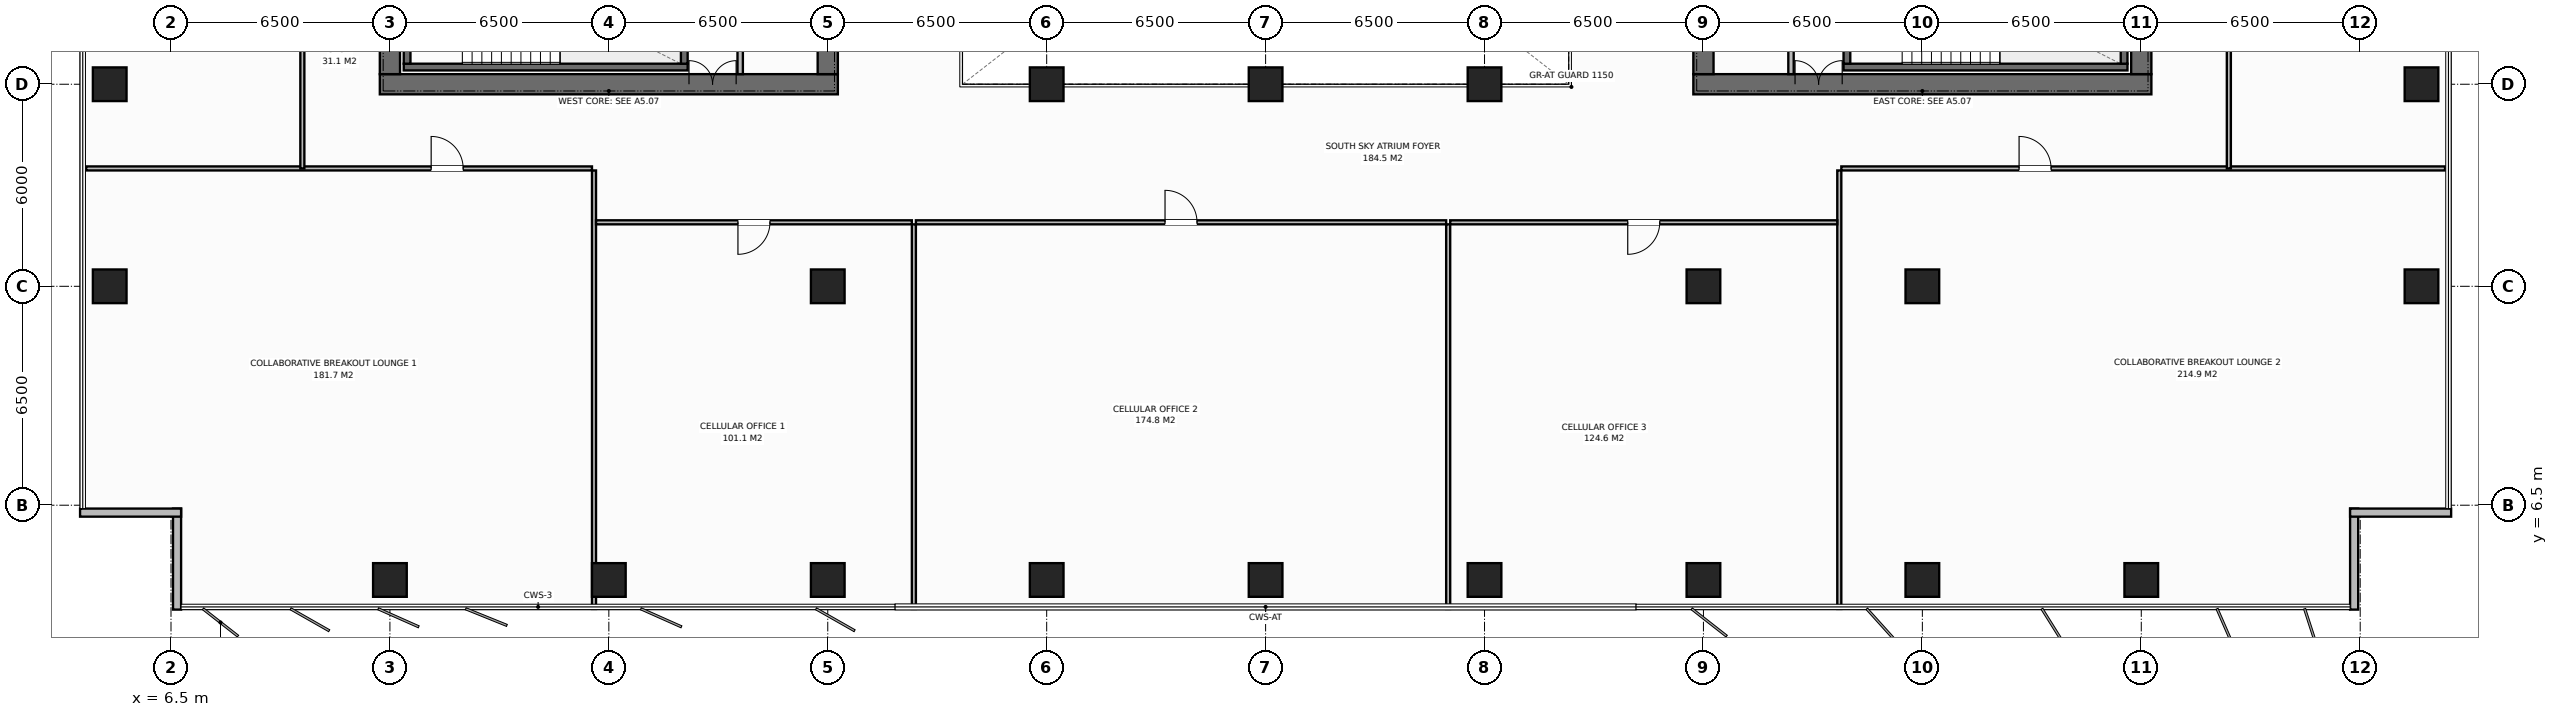
"""IFC4 building model, lengths in metres.
Left out: names, types, materials, properties, quantities, classifications, styles, units other than length and angle.
Written with IfcOpenShell. Run it as: python <this file> out.ifc"""

import sys

from ifc_helpers import new_model, si_unit, direction, frame, frame_2d, origin, origin_2d, place, context, subcontext, project, spatial, rectangle, extrude, element, fill, save


model = new_model("IFC4")
c1 = context("Model", 3, precision=1e-05, world=origin(), true_north=direction((0.0, 1.0)))
c2 = subcontext(c1, "Body", "Model", "MODEL_VIEW")
j1 = project(units=[si_unit("LENGTHUNIT", "METRE"), si_unit("PLANEANGLEUNIT", "RADIAN")], contexts=[c1])
p1 = place(None, origin())
s1 = spatial("IfcSite", under=j1, at=p1, CompositionType="ELEMENT")
p2 = place(p1, origin())
s2 = spatial("IfcBuilding", under=s1, at=p2, CompositionType="ELEMENT")
p3 = place(p2, frame((0.0, 0.0, 148.0)))
s3 = spatial("IfcBuildingStorey", under=s2, at=p3, CompositionType="ELEMENT", Elevation=148.0)
p4 = place(p3, frame((12.7, 19.0, 0.0), z_axis=(0.0, 0.0, 1.0), x_axis=(1.0, 0.0, 0.0)))
e1 = element("IfcWall", 1, at=p4, inside=s3, PredefinedType="SHEAR", context=c2, shape_type="SweptSolid", body=[
    extrude(rectangle(XDim=13.6, YDim=0.6, at=frame_2d((6.8, 0.0))), origin(), (0.0, 0.0, 1.0), 3.8),
])
p5 = place(p4, frame((9.18, 0.0, 0.0)))
e2 = element("IfcOpeningElement", 2, at=p5, cuts=e1, PredefinedType="OPENING", context=c2, shape_type="SweptSolid", body=[
    extrude(rectangle(XDim=1.4, YDim=2.2, at=frame_2d((0.7, 1.1))), frame((0.0, 0.31, 0.0), z_axis=(0.0, -1.0, 0.0), x_axis=(1.0, 0.0, 0.0)), (0.0, 0.0, 1.0), 0.62),
])
p6 = place(p3, frame((13.0, 19.3, 0.0), z_axis=(0.0, 0.0, 1.0), x_axis=(0.0, 1.0, 0.0)))
e3 = element("IfcWall", 3, at=p6, inside=s3, PredefinedType="SHEAR", context=c2, shape_type="SweptSolid", body=[
    extrude(rectangle(XDim=13.4, YDim=0.6, at=frame_2d((6.7, 0.0))), origin(), (0.0, 0.0, 1.0), 3.8),
])
p7 = place(p6, frame((4.75, 0.0, 0.0)))
e4 = element("IfcOpeningElement", 4, at=p7, cuts=e3, PredefinedType="OPENING", context=c2, shape_type="SweptSolid", body=[
    extrude(rectangle(XDim=1.4, YDim=2.2, at=frame_2d((0.7, 1.1))), frame((0.0, 0.31, 0.0), z_axis=(0.0, -1.0, 0.0), x_axis=(1.0, 0.0, 0.0)), (0.0, 0.0, 1.0), 0.62),
])
p8 = place(p3, frame((26.0, 19.3, 0.0), z_axis=(0.0, 0.0, 1.0), x_axis=(0.0, 1.0, 0.0)))
e5 = element("IfcWall", 5, at=p8, inside=s3, PredefinedType="SHEAR", context=c2, shape_type="SweptSolid", body=[
    extrude(rectangle(XDim=13.4, YDim=0.6, at=frame_2d((6.7, 0.0))), origin(), (0.0, 0.0, 1.0), 3.8),
])
p9 = place(p3, frame((51.7, 19.0, 0.0), z_axis=(0.0, 0.0, 1.0), x_axis=(1.0, 0.0, 0.0)))
e6 = element("IfcWall", 6, at=p9, inside=s3, PredefinedType="SHEAR", context=c2, shape_type="SweptSolid", body=[
    extrude(rectangle(XDim=13.6, YDim=0.6, at=frame_2d((6.8, 0.0))), origin(), (0.0, 0.0, 1.0), 3.8),
])
p10 = place(p9, frame((3.02, 0.0, 0.0)))
e7 = element("IfcOpeningElement", 7, at=p10, cuts=e6, PredefinedType="OPENING", context=c2, shape_type="SweptSolid", body=[
    extrude(rectangle(XDim=1.4, YDim=2.2, at=frame_2d((0.7, 1.1))), frame((0.0, 0.31, 0.0), z_axis=(0.0, -1.0, 0.0), x_axis=(1.0, 0.0, 0.0)), (0.0, 0.0, 1.0), 0.62),
])
p11 = place(p3, frame((52.0, 19.3, 0.0), z_axis=(0.0, 0.0, 1.0), x_axis=(0.0, 1.0, 0.0)))
e8 = element("IfcWall", 8, at=p11, inside=s3, PredefinedType="SHEAR", context=c2, shape_type="SweptSolid", body=[
    extrude(rectangle(XDim=13.4, YDim=0.6, at=frame_2d((6.7, 0.0))), origin(), (0.0, 0.0, 1.0), 3.8),
])
p12 = place(p3, frame((65.0, 19.3, 0.0), z_axis=(0.0, 0.0, 1.0), x_axis=(0.0, 1.0, 0.0)))
e9 = element("IfcWall", 9, at=p12, inside=s3, PredefinedType="SHEAR", context=c2, shape_type="SweptSolid", body=[
    extrude(rectangle(XDim=13.4, YDim=0.6, at=frame_2d((6.7, 0.0))), origin(), (0.0, 0.0, 1.0), 3.8),
])
p13 = place(p12, frame((8.15, 0.0, 0.0)))
e10 = element("IfcOpeningElement", 10, at=p13, cuts=e9, PredefinedType="OPENING", context=c2, shape_type="SweptSolid", body=[
    extrude(rectangle(XDim=1.3, YDim=2.2, at=frame_2d((0.65, 1.1))), frame((0.0, 0.31, 0.0), z_axis=(0.0, -1.0, 0.0), x_axis=(1.0, 0.0, 0.0)), (0.0, 0.0, 1.0), 0.62),
])
p14 = place(p3, frame((13.41, 19.51, 0.0), z_axis=(0.0, 0.0, 1.0), x_axis=(1.0, 0.0, 0.0)))
e11 = element("IfcWall", 11, at=p14, inside=s3, PredefinedType="SHEAR", context=c2, shape_type="SweptSolid", body=[
    extrude(rectangle(XDim=8.43, YDim=0.2, at=frame_2d((4.215, 0.0))), origin(), (0.0, 0.0, 1.0), 3.8),
])
for number, where, z_axis, x_axis in (
    (12, (13.51, 19.61, 0.0), (0.0, 0.0, 1.0), (0.0, 1.0, 0.0)),
    (13, (21.74, 19.61, 0.0), (0.0, 0.0, 1.0), (0.0, 1.0, 0.0)),
):
    element("IfcWall", number, at=place(p3, frame(where, z_axis=z_axis, x_axis=x_axis)), inside=s3, PredefinedType="SHEAR", context=c2, shape_type="SweptSolid", body=[
        extrude(rectangle(XDim=3.28, YDim=0.2, at=frame_2d((1.64, 0.0))), origin(), (0.0, 0.0, 1.0), 3.8),
    ])
p15 = place(p3, frame((56.16, 19.51, 0.0), z_axis=(0.0, 0.0, 1.0), x_axis=(1.0, 0.0, 0.0)))
e14 = element("IfcWall", 14, at=p15, inside=s3, PredefinedType="SHEAR", context=c2, shape_type="SweptSolid", body=[
    extrude(rectangle(XDim=8.43, YDim=0.2, at=frame_2d((4.215, 0.0))), origin(), (0.0, 0.0, 1.0), 3.8),
])
for number, where, z_axis, x_axis in (
    (15, (56.26, 19.61, 0.0), (0.0, 0.0, 1.0), (0.0, 1.0, 0.0)),
    (16, (64.49, 19.61, 0.0), (0.0, 0.0, 1.0), (0.0, 1.0, 0.0)),
):
    element("IfcWall", number, at=place(p3, frame(where, z_axis=z_axis, x_axis=x_axis)), inside=s3, PredefinedType="SHEAR", context=c2, shape_type="SweptSolid", body=[
        extrude(rectangle(XDim=3.28, YDim=0.2, at=frame_2d((1.64, 0.0))), origin(), (0.0, 0.0, 1.0), 3.8),
    ])
for number, where, z_axis, x_axis in (
    (17, (58.5, 13.0, 0.0), (0.0, 0.0, 1.0), (1.0, 0.0, 0.0)),
    (18, (32.5, 19.0, 0.0), (0.0, 0.0, 1.0), (1.0, 0.0, 0.0)),
    (19, (39.0, 19.0, 0.0), (0.0, 0.0, 1.0), (1.0, 0.0, 0.0)),
    (20, (45.5, 19.0, 0.0), (0.0, 0.0, 1.0), (1.0, 0.0, 0.0)),
    (21, (26.0, 13.0, 0.0), (0.0, 0.0, 1.0), (1.0, 0.0, 0.0)),
    (22, (52.0, 13.0, 0.0), (0.0, 0.0, 1.0), (1.0, 0.0, 0.0)),
    (23, (13.0, 4.28, 0.0), (0.0, 0.0, 1.0), (1.0, 0.0, 0.0)),
    (24, (19.5, 4.28, 0.0), (0.0, 0.0, 1.0), (1.0, 0.0, 0.0)),
    (25, (26.0, 4.28, 0.0), (0.0, 0.0, 1.0), (1.0, 0.0, 0.0)),
    (26, (32.5, 4.28, 0.0), (0.0, 0.0, 1.0), (1.0, 0.0, 0.0)),
    (27, (39.0, 4.28, 0.0), (0.0, 0.0, 1.0), (1.0, 0.0, 0.0)),
    (28, (45.5, 4.28, 0.0), (0.0, 0.0, 1.0), (1.0, 0.0, 0.0)),
    (29, (52.0, 4.28, 0.0), (0.0, 0.0, 1.0), (1.0, 0.0, 0.0)),
    (30, (58.5, 4.28, 0.0), (0.0, 0.0, 1.0), (1.0, 0.0, 0.0)),
    (31, (65.0, 4.28, 0.0), (0.0, 0.0, 1.0), (1.0, 0.0, 0.0)),
    (32, (4.68, 13.0, 0.0), (0.0, 0.0, 1.0), (1.0, 0.0, 0.0)),
    (33, (73.32, 13.0, 0.0), (0.0, 0.0, 1.0), (1.0, 0.0, 0.0)),
    (34, (4.68, 19.0, 0.0), (0.0, 0.0, 1.0), (1.0, 0.0, 0.0)),
    (35, (73.32, 19.0, 0.0), (0.0, 0.0, 1.0), (1.0, 0.0, 0.0)),
):
    element("IfcColumn", number, at=place(p3, frame(where, z_axis=z_axis, x_axis=x_axis)), inside=s3, PredefinedType="COLUMN", context=c2, shape_type="SweptSolid", body=[
        extrude(rectangle(XDim=1.0, YDim=1.0, at=origin_2d()), origin(), (0.0, 0.0, 1.0), 3.8),
    ])
for number, where, z_axis, x_axis in (
    (36, (6.68, 3.4, 0.0), (0.0, 0.0, 1.0), (0.0, 1.0, 0.0)),
    (37, (6.8, 6.28, 0.0), (0.0, 0.0, 1.0), (-1.0, 0.0, 0.0)),
    (38, (71.32, 6.4, 0.0), (0.0, 0.0, 1.0), (0.0, -1.0, 0.0)),
    (39, (74.2, 6.28, 0.0), (0.0, 0.0, 1.0), (-1.0, 0.0, 0.0)),
):
    element("IfcWall", number, at=place(p3, frame(where, z_axis=z_axis, x_axis=x_axis)), inside=s3, PredefinedType="STANDARD", context=c2, shape_type="SweptSolid", body=[
        extrude(rectangle(XDim=3.0, YDim=0.24, at=frame_2d((1.5, 0.0))), origin(), (0.0, 0.0, 1.0), 3.572),
    ])
p16 = place(p3, frame((23.4, 19.3, 0.0), z_axis=(0.0, 0.0, 1.0), x_axis=(0.0, 1.0, 0.0)))
e40 = element("IfcWall", 40, at=p16, inside=s3, PredefinedType="STANDARD", context=c2, shape_type="SweptSolid", body=[
    extrude(rectangle(XDim=13.4, YDim=0.16, at=frame_2d((6.7, 0.0))), origin(), (0.0, 0.0, 1.0), 3.572),
])
p17 = place(p16, frame((1.7, 0.0, 0.0)))
e41 = element("IfcOpeningElement", 41, at=p17, cuts=e40, PredefinedType="OPENING", context=c2, shape_type="SweptSolid", body=[
    extrude(rectangle(XDim=0.95, YDim=2.15, at=frame_2d((0.475, 1.075))), frame((0.0, 0.09, 0.0), z_axis=(0.0, -1.0, 0.0), x_axis=(1.0, 0.0, 0.0)), (0.0, 0.0, 1.0), 0.18),
])
p18 = place(p16, frame((9.3, 0.0, 0.0)))
e42 = element("IfcOpeningElement", 42, at=p18, cuts=e40, PredefinedType="OPENING", context=c2, shape_type="SweptSolid", body=[
    extrude(rectangle(XDim=1.1, YDim=2.2, at=frame_2d((0.55, 1.1))), frame((0.0, 0.09, 0.0), z_axis=(0.0, -1.0, 0.0), x_axis=(1.0, 0.0, 0.0)), (0.0, 0.0, 1.0), 0.18),
])
p19 = place(p16, frame((11.5, 0.0, 0.0)))
e43 = element("IfcOpeningElement", 43, at=p19, cuts=e40, PredefinedType="OPENING", context=c2, shape_type="SweptSolid", body=[
    extrude(rectangle(XDim=1.1, YDim=2.2, at=frame_2d((0.55, 1.1))), frame((0.0, 0.09, 0.0), z_axis=(0.0, -1.0, 0.0), x_axis=(1.0, 0.0, 0.0)), (0.0, 0.0, 1.0), 0.18),
])
p20 = place(p3, frame((54.6, 19.3, 0.0), z_axis=(0.0, 0.0, 1.0), x_axis=(0.0, 1.0, 0.0)))
e44 = element("IfcWall", 44, at=p20, inside=s3, PredefinedType="STANDARD", context=c2, shape_type="SweptSolid", body=[
    extrude(rectangle(XDim=13.4, YDim=0.16, at=frame_2d((6.7, 0.0))), origin(), (0.0, 0.0, 1.0), 3.572),
])
p21 = place(p20, frame((1.7, 0.0, 0.0)))
e45 = element("IfcOpeningElement", 45, at=p21, cuts=e44, PredefinedType="OPENING", context=c2, shape_type="SweptSolid", body=[
    extrude(rectangle(XDim=0.95, YDim=2.15, at=frame_2d((0.475, 1.075))), frame((0.0, 0.09, 0.0), z_axis=(0.0, -1.0, 0.0), x_axis=(1.0, 0.0, 0.0)), (0.0, 0.0, 1.0), 0.18),
])
p22 = place(p20, frame((9.3, 0.0, 0.0)))
e46 = element("IfcOpeningElement", 46, at=p22, cuts=e44, PredefinedType="OPENING", context=c2, shape_type="SweptSolid", body=[
    extrude(rectangle(XDim=1.1, YDim=2.2, at=frame_2d((0.55, 1.1))), frame((0.0, 0.09, 0.0), z_axis=(0.0, -1.0, 0.0), x_axis=(1.0, 0.0, 0.0)), (0.0, 0.0, 1.0), 0.18),
])
p23 = place(p20, frame((11.5, 0.0, 0.0)))
e47 = element("IfcOpeningElement", 47, at=p23, cuts=e44, PredefinedType="OPENING", context=c2, shape_type="SweptSolid", body=[
    extrude(rectangle(XDim=1.1, YDim=2.2, at=frame_2d((0.55, 1.1))), frame((0.0, 0.09, 0.0), z_axis=(0.0, -1.0, 0.0), x_axis=(1.0, 0.0, 0.0)), (0.0, 0.0, 1.0), 0.18),
])
p24 = place(p3, frame((19.06, 3.42, 0.0), z_axis=(0.0, 0.0, 1.0), x_axis=(0.0, 1.0, 0.0)))
e48 = element("IfcWall", 48, at=p24, inside=s3, PredefinedType="PARTITIONING", context=c2, shape_type="SweptSolid", body=[
    extrude(rectangle(XDim=13.02, YDim=0.12, at=frame_2d((6.51, 0.0))), origin(), (0.0, 0.0, 1.0), 3.572),
])
p25 = place(p3, frame((3.98, 16.5, 0.0), z_axis=(0.0, 0.0, 1.0), x_axis=(1.0, 0.0, 0.0)))
e49 = element("IfcWall", 49, at=p25, inside=s3, PredefinedType="PARTITIONING", context=c2, shape_type="SweptSolid", body=[
    extrude(rectangle(XDim=15.02, YDim=0.12, at=frame_2d((7.51, 0.0))), origin(), (0.0, 0.0, 1.0), 3.572),
])
p26 = place(p25, frame((10.245, 0.0, 0.0)))
e50 = element("IfcOpeningElement", 50, at=p26, cuts=e49, PredefinedType="OPENING", context=c2, shape_type="SweptSolid", body=[
    extrude(rectangle(XDim=0.95, YDim=2.15, at=frame_2d((0.475, 1.075))), frame((0.0, 0.07, 0.0), z_axis=(0.0, -1.0, 0.0), x_axis=(1.0, 0.0, 0.0)), (0.0, 0.0, 1.0), 0.14),
])
p27 = place(p3, frame((28.557, 3.42, 0.0), z_axis=(0.0, 0.0, 1.0), x_axis=(0.0, 1.0, 0.0)))
e51 = element("IfcWall", 51, at=p27, inside=s3, PredefinedType="PARTITIONING", context=c2, shape_type="SweptSolid", body=[
    extrude(rectangle(XDim=11.42, YDim=0.12, at=frame_2d((5.71, 0.0))), origin(), (0.0, 0.0, 1.0), 3.572),
])
p28 = place(p3, frame((19.12, 14.9, 0.0), z_axis=(0.0, 0.0, 1.0), x_axis=(1.0, 0.0, 0.0)))
e52 = element("IfcWall", 52, at=p28, inside=s3, PredefinedType="PARTITIONING", context=c2, shape_type="SweptSolid", body=[
    extrude(rectangle(XDim=9.377, YDim=0.12, at=frame_2d((4.689, 0.0))), origin(), (0.0, 0.0, 1.0), 3.572),
])
p29 = place(p28, frame((4.214, 0.0, 0.0)))
e53 = element("IfcOpeningElement", 53, at=p29, cuts=e52, PredefinedType="OPENING", context=c2, shape_type="SweptSolid", body=[
    extrude(rectangle(XDim=0.95, YDim=2.15, at=frame_2d((0.475, 1.075))), frame((0.0, 0.07, 0.0), z_axis=(0.0, -1.0, 0.0), x_axis=(1.0, 0.0, 0.0)), (0.0, 0.0, 1.0), 0.14),
])
p30 = place(p3, frame((44.421, 3.42, 0.0), z_axis=(0.0, 0.0, 1.0), x_axis=(0.0, 1.0, 0.0)))
e54 = element("IfcWall", 54, at=p30, inside=s3, PredefinedType="PARTITIONING", context=c2, shape_type="SweptSolid", body=[
    extrude(rectangle(XDim=11.42, YDim=0.12, at=frame_2d((5.71, 0.0))), origin(), (0.0, 0.0, 1.0), 3.572),
])
p31 = place(p3, frame((28.617, 14.9, 0.0), z_axis=(0.0, 0.0, 1.0), x_axis=(1.0, 0.0, 0.0)))
e55 = element("IfcWall", 55, at=p31, inside=s3, PredefinedType="PARTITIONING", context=c2, shape_type="SweptSolid", body=[
    extrude(rectangle(XDim=15.744, YDim=0.12, at=frame_2d((7.872, 0.0))), origin(), (0.0, 0.0, 1.0), 3.572),
])
p32 = place(p31, frame((7.397, 0.0, 0.0)))
e56 = element("IfcOpeningElement", 56, at=p32, cuts=e55, PredefinedType="OPENING", context=c2, shape_type="SweptSolid", body=[
    extrude(rectangle(XDim=0.95, YDim=2.15, at=frame_2d((0.475, 1.075))), frame((0.0, 0.07, 0.0), z_axis=(0.0, -1.0, 0.0), x_axis=(1.0, 0.0, 0.0)), (0.0, 0.0, 1.0), 0.14),
])
p33 = place(p3, frame((56.034, 3.42, 0.0), z_axis=(0.0, 0.0, 1.0), x_axis=(0.0, 1.0, 0.0)))
e57 = element("IfcWall", 57, at=p33, inside=s3, PredefinedType="PARTITIONING", context=c2, shape_type="SweptSolid", body=[
    extrude(rectangle(XDim=13.02, YDim=0.12, at=frame_2d((6.51, 0.0))), origin(), (0.0, 0.0, 1.0), 3.572),
])
p34 = place(p3, frame((44.481, 14.9, 0.0), z_axis=(0.0, 0.0, 1.0), x_axis=(1.0, 0.0, 0.0)))
e58 = element("IfcWall", 58, at=p34, inside=s3, PredefinedType="PARTITIONING", context=c2, shape_type="SweptSolid", body=[
    extrude(rectangle(XDim=11.492, YDim=0.12, at=frame_2d((5.746, 0.0))), origin(), (0.0, 0.0, 1.0), 3.572),
])
p35 = place(p34, frame((5.271, 0.0, 0.0)))
e59 = element("IfcOpeningElement", 59, at=p35, cuts=e58, PredefinedType="OPENING", context=c2, shape_type="SweptSolid", body=[
    extrude(rectangle(XDim=0.95, YDim=2.15, at=frame_2d((0.475, 1.075))), frame((0.0, 0.07, 0.0), z_axis=(0.0, -1.0, 0.0), x_axis=(1.0, 0.0, 0.0)), (0.0, 0.0, 1.0), 0.14),
])
p36 = place(p3, frame((56.094, 16.5, 0.0), z_axis=(0.0, 0.0, 1.0), x_axis=(1.0, 0.0, 0.0)))
e60 = element("IfcWall", 60, at=p36, inside=s3, PredefinedType="PARTITIONING", context=c2, shape_type="SweptSolid", body=[
    extrude(rectangle(XDim=17.926, YDim=0.12, at=frame_2d((8.963, 0.0))), origin(), (0.0, 0.0, 1.0), 3.572),
])
p37 = place(p36, frame((5.278, 0.0, 0.0)))
e61 = element("IfcOpeningElement", 61, at=p37, cuts=e60, PredefinedType="OPENING", context=c2, shape_type="SweptSolid", body=[
    extrude(rectangle(XDim=0.95, YDim=2.15, at=frame_2d((0.475, 1.075))), frame((0.0, 0.07, 0.0), z_axis=(0.0, -1.0, 0.0), x_axis=(1.0, 0.0, 0.0)), (0.0, 0.0, 1.0), 0.14),
])
p38 = place(p3, frame((10.4, 16.5, 0.0), z_axis=(0.0, 0.0, 1.0), x_axis=(0.0, 1.0, 0.0)))
e62 = element("IfcWall", 62, at=p38, inside=s3, PredefinedType="PARTITIONING", context=c2, shape_type="SweptSolid", body=[
    extrude(rectangle(XDim=9.5, YDim=0.12, at=frame_2d((4.75, 0.0))), origin(), (0.0, 0.0, 1.0), 3.572),
])
p39 = place(p38, frame((5.325, 0.0, 0.0)))
e63 = element("IfcOpeningElement", 63, at=p39, cuts=e62, PredefinedType="OPENING", context=c2, shape_type="SweptSolid", body=[
    extrude(rectangle(XDim=0.95, YDim=2.15, at=frame_2d((0.475, 1.075))), frame((0.0, 0.07, 0.0), z_axis=(0.0, -1.0, 0.0), x_axis=(1.0, 0.0, 0.0)), (0.0, 0.0, 1.0), 0.14),
])
p40 = place(p3, frame((67.6, 16.5, 0.0), z_axis=(0.0, 0.0, 1.0), x_axis=(0.0, 1.0, 0.0)))
e64 = element("IfcWall", 64, at=p40, inside=s3, PredefinedType="PARTITIONING", context=c2, shape_type="SweptSolid", body=[
    extrude(rectangle(XDim=19.0, YDim=0.12, at=frame_2d((9.5, 0.0))), origin(), (0.0, 0.0, 1.0), 3.572),
])
p41 = place(p40, frame((9.025, 0.0, 0.0)))
e65 = element("IfcOpeningElement", 65, at=p41, cuts=e64, PredefinedType="OPENING", context=c2, shape_type="SweptSolid", body=[
    extrude(rectangle(XDim=0.95, YDim=2.15, at=frame_2d((0.475, 1.075))), frame((0.0, 0.07, 0.0), z_axis=(0.0, -1.0, 0.0), x_axis=(1.0, 0.0, 0.0)), (0.0, 0.0, 1.0), 0.14),
])
p42 = place(p5, origin())
e66 = element("IfcDoor", 66, at=p42, inside=s3, OperationType="DOUBLE_DOOR_SINGLE_SWING", PredefinedType="DOOR", context=c2, shape_type="SweptSolid", body=[
    extrude(rectangle(XDim=1.4, YDim=2.2, at=frame_2d((0.7, 1.1))), frame((0.0, 0.075, 0.0), z_axis=(0.0, -1.0, 0.0), x_axis=(1.0, 0.0, 0.0)), (0.0, 0.0, 1.0), 0.05),
])
fill(e2, e66)
p43 = place(p10, origin())
e67 = element("IfcDoor", 67, at=p43, inside=s3, OperationType="DOUBLE_DOOR_SINGLE_SWING", PredefinedType="DOOR", context=c2, shape_type="SweptSolid", body=[
    extrude(rectangle(XDim=1.4, YDim=2.2, at=frame_2d((0.7, 1.1))), frame((0.0, 0.075, 0.0), z_axis=(0.0, -1.0, 0.0), x_axis=(1.0, 0.0, 0.0)), (0.0, 0.0, 1.0), 0.05),
])
fill(e7, e67)
p44 = place(p26, origin())
e68 = element("IfcDoor", 68, at=p44, inside=s3, OperationType="SINGLE_SWING_LEFT", PredefinedType="DOOR", context=c2, shape_type="SweptSolid", body=[
    extrude(rectangle(XDim=0.95, YDim=2.15, at=frame_2d((0.475, 1.075))), frame((0.0, 0.025, 0.0), z_axis=(0.0, -1.0, 0.0), x_axis=(1.0, 0.0, 0.0)), (0.0, 0.0, 1.0), 0.05),
])
fill(e50, e68)
p45 = place(p29, origin())
e69 = element("IfcDoor", 69, at=p45, inside=s3, OperationType="SINGLE_SWING_RIGHT", PredefinedType="DOOR", context=c2, shape_type="SweptSolid", body=[
    extrude(rectangle(XDim=0.95, YDim=2.15, at=frame_2d((0.475, 1.075))), frame((0.0, 0.025, 0.0), z_axis=(0.0, -1.0, 0.0), x_axis=(1.0, 0.0, 0.0)), (0.0, 0.0, 1.0), 0.05),
])
fill(e53, e69)
p46 = place(p32, origin())
e70 = element("IfcDoor", 70, at=p46, inside=s3, OperationType="SINGLE_SWING_LEFT", PredefinedType="DOOR", context=c2, shape_type="SweptSolid", body=[
    extrude(rectangle(XDim=0.95, YDim=2.15, at=frame_2d((0.475, 1.075))), frame((0.0, 0.025, 0.0), z_axis=(0.0, -1.0, 0.0), x_axis=(1.0, 0.0, 0.0)), (0.0, 0.0, 1.0), 0.05),
])
fill(e56, e70)
p47 = place(p35, origin())
e71 = element("IfcDoor", 71, at=p47, inside=s3, OperationType="SINGLE_SWING_RIGHT", PredefinedType="DOOR", context=c2, shape_type="SweptSolid", body=[
    extrude(rectangle(XDim=0.95, YDim=2.15, at=frame_2d((0.475, 1.075))), frame((0.0, 0.025, 0.0), z_axis=(0.0, -1.0, 0.0), x_axis=(1.0, 0.0, 0.0)), (0.0, 0.0, 1.0), 0.05),
])
fill(e59, e71)
p48 = place(p37, origin())
e72 = element("IfcDoor", 72, at=p48, inside=s3, OperationType="SINGLE_SWING_LEFT", PredefinedType="DOOR", context=c2, shape_type="SweptSolid", body=[
    extrude(rectangle(XDim=0.95, YDim=2.15, at=frame_2d((0.475, 1.075))), frame((0.0, 0.025, 0.0), z_axis=(0.0, -1.0, 0.0), x_axis=(1.0, 0.0, 0.0)), (0.0, 0.0, 1.0), 0.05),
])
fill(e61, e72)
save(model, sys.argv[1])
